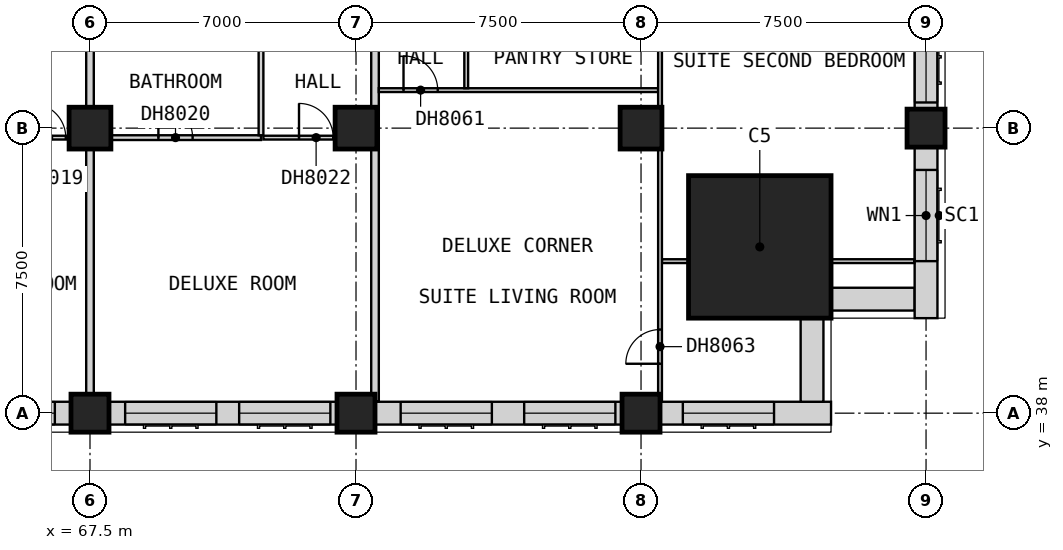
"""IFC4 building model, lengths in metres.
Left out: names, types, materials, properties, quantities, classifications, styles, units other than length and angle.
Written with IfcOpenShell. Run it as: python <this file> out.ifc"""

import sys

from ifc_helpers import new_model, si_unit, direction, frame, frame_2d, origin, origin_2d, place, context, subcontext, project, spatial, rectangle, extrude, element, fill, save


model = new_model("IFC4")
c1 = context("Model", 3, precision=1e-05, world=origin(), true_north=direction((0.0, 1.0)))
c2 = subcontext(c1, "Body", "Model", "MODEL_VIEW")
j1 = project(units=[si_unit("LENGTHUNIT", "METRE"), si_unit("PLANEANGLEUNIT", "RADIAN")], contexts=[c1])
p1 = place(None, origin())
s1 = spatial("IfcSite", under=j1, at=p1, CompositionType="ELEMENT")
p2 = place(p1, origin())
s2 = spatial("IfcBuilding", under=s1, at=p2, CompositionType="ELEMENT")
p3 = place(p2, frame((0.0, 0.0, 89.9)))
s3 = spatial("IfcBuildingStorey", under=s2, at=p3, CompositionType="ELEMENT", Elevation=89.9)
p4 = place(p3, frame((67.5, 38.0, 0.0), z_axis=(0.0, 0.0, 1.0), x_axis=(1.0, 0.0, 0.0)))
e1 = element("IfcColumn", 1, at=p4, inside=s3, PredefinedType="COLUMN", context=c2, shape_type="SweptSolid", body=[
    extrude(rectangle(XDim=1.0, YDim=1.0, at=origin_2d()), origin(), (0.0, 0.0, 1.0), 3.6),
])
p5 = place(p3, frame((67.5, 45.5, 0.0), z_axis=(0.0, 0.0, 1.0), x_axis=(1.0, 0.0, 0.0)))
e2 = element("IfcColumn", 2, at=p5, inside=s3, PredefinedType="COLUMN", context=c2, shape_type="SweptSolid", body=[
    extrude(rectangle(XDim=1.1, YDim=1.1, at=origin_2d()), origin(), (0.0, 0.0, 1.0), 3.6),
])
p6 = place(p3, frame((74.5, 38.0, 0.0), z_axis=(0.0, 0.0, 1.0), x_axis=(1.0, 0.0, 0.0)))
e3 = element("IfcColumn", 3, at=p6, inside=s3, PredefinedType="COLUMN", context=c2, shape_type="SweptSolid", body=[
    extrude(rectangle(XDim=1.0, YDim=1.0, at=origin_2d()), origin(), (0.0, 0.0, 1.0), 3.6),
])
p7 = place(p3, frame((74.5, 45.5, 0.0), z_axis=(0.0, 0.0, 1.0), x_axis=(1.0, 0.0, 0.0)))
e4 = element("IfcColumn", 4, at=p7, inside=s3, PredefinedType="COLUMN", context=c2, shape_type="SweptSolid", body=[
    extrude(rectangle(XDim=1.1, YDim=1.1, at=origin_2d()), origin(), (0.0, 0.0, 1.0), 3.6),
])
p8 = place(p3, frame((82.0, 38.0, 0.0), z_axis=(0.0, 0.0, 1.0), x_axis=(1.0, 0.0, 0.0)))
e5 = element("IfcColumn", 5, at=p8, inside=s3, PredefinedType="COLUMN", context=c2, shape_type="SweptSolid", body=[
    extrude(rectangle(XDim=1.0, YDim=1.0, at=origin_2d()), origin(), (0.0, 0.0, 1.0), 3.6),
])
p9 = place(p3, frame((82.0, 45.5, 0.0), z_axis=(0.0, 0.0, 1.0), x_axis=(1.0, 0.0, 0.0)))
e6 = element("IfcColumn", 6, at=p9, inside=s3, PredefinedType="COLUMN", context=c2, shape_type="SweptSolid", body=[
    extrude(rectangle(XDim=1.1, YDim=1.1, at=origin_2d()), origin(), (0.0, 0.0, 1.0), 3.6),
])
p10 = place(p3, frame((89.5, 45.5, 0.0), z_axis=(0.0, 0.0, 1.0), x_axis=(1.0, 0.0, 0.0)))
e7 = element("IfcColumn", 7, at=p10, inside=s3, PredefinedType="COLUMN", context=c2, shape_type="SweptSolid", body=[
    extrude(rectangle(XDim=1.0, YDim=1.0, at=origin_2d()), origin(), (0.0, 0.0, 1.0), 3.6),
])
p11 = place(p3, frame((85.125, 42.375, 0.0), z_axis=(0.0, 0.0, 1.0), x_axis=(1.0, 0.0, 0.0)))
e8 = element("IfcColumn", 8, at=p11, inside=s3, PredefinedType="COLUMN", context=c2, shape_type="SweptSolid", body=[
    extrude(rectangle(XDim=3.75, YDim=3.75, at=origin_2d()), origin(), (0.0, 0.0, 1.0), 3.6),
])
p12 = place(p3, frame((60.5, 38.0, 0.0), z_axis=(0.0, 0.0, 1.0), x_axis=(1.0, 0.0, 0.0)))
e9 = element("IfcWall", 9, at=p12, inside=s3, PredefinedType="SOLIDWALL", context=c2, shape_type="SweptSolid", body=[
    extrude(rectangle(XDim=6.5, YDim=0.6, at=frame_2d((3.25, 0.0))), origin(), (0.0, 0.0, 1.0), 2.85),
])
p13 = place(p12, frame((0.425, 0.0, 0.8)))
e10 = element("IfcOpeningElement", 10, at=p13, cuts=e9, PredefinedType="OPENING", context=c2, shape_type="SweptSolid", body=[
    extrude(rectangle(XDim=2.4, YDim=1.8, at=frame_2d((1.2, 0.9))), frame((0.0, 0.31, 0.0), z_axis=(0.0, -1.0, 0.0), x_axis=(1.0, 0.0, 0.0)), (0.0, 0.0, 1.0), 0.62),
])
p14 = place(p12, frame((3.675, 0.0, 0.8)))
e11 = element("IfcOpeningElement", 11, at=p14, cuts=e9, PredefinedType="OPENING", context=c2, shape_type="SweptSolid", body=[
    extrude(rectangle(XDim=2.4, YDim=1.8, at=frame_2d((1.2, 0.9))), frame((0.0, 0.31, 0.0), z_axis=(0.0, -1.0, 0.0), x_axis=(1.0, 0.0, 0.0)), (0.0, 0.0, 1.0), 0.62),
])
p15 = place(p3, frame((68.0, 38.0, 0.0), z_axis=(0.0, 0.0, 1.0), x_axis=(1.0, 0.0, 0.0)))
e12 = element("IfcWall", 12, at=p15, inside=s3, PredefinedType="SOLIDWALL", context=c2, shape_type="SweptSolid", body=[
    extrude(rectangle(XDim=6.0, YDim=0.6, at=frame_2d((3.0, 0.0))), origin(), (0.0, 0.0, 1.0), 2.85),
])
p16 = place(p15, frame((0.425, 0.0, 0.8)))
e13 = element("IfcOpeningElement", 13, at=p16, cuts=e12, PredefinedType="OPENING", context=c2, shape_type="SweptSolid", body=[
    extrude(rectangle(XDim=2.4, YDim=1.8, at=frame_2d((1.2, 0.9))), frame((0.0, 0.31, 0.0), z_axis=(0.0, -1.0, 0.0), x_axis=(1.0, 0.0, 0.0)), (0.0, 0.0, 1.0), 0.62),
])
p17 = place(p15, frame((3.425, 0.0, 0.8)))
e14 = element("IfcOpeningElement", 14, at=p17, cuts=e12, PredefinedType="OPENING", context=c2, shape_type="SweptSolid", body=[
    extrude(rectangle(XDim=2.4, YDim=1.8, at=frame_2d((1.2, 0.9))), frame((0.0, 0.31, 0.0), z_axis=(0.0, -1.0, 0.0), x_axis=(1.0, 0.0, 0.0)), (0.0, 0.0, 1.0), 0.62),
])
p18 = place(p3, frame((75.0, 38.0, 0.0), z_axis=(0.0, 0.0, 1.0), x_axis=(1.0, 0.0, 0.0)))
e15 = element("IfcWall", 15, at=p18, inside=s3, PredefinedType="SOLIDWALL", context=c2, shape_type="SweptSolid", body=[
    extrude(rectangle(XDim=6.5, YDim=0.6, at=frame_2d((3.25, 0.0))), origin(), (0.0, 0.0, 1.0), 2.85),
])
p19 = place(p18, frame((0.675, 0.0, 0.8)))
e16 = element("IfcOpeningElement", 16, at=p19, cuts=e15, PredefinedType="OPENING", context=c2, shape_type="SweptSolid", body=[
    extrude(rectangle(XDim=2.4, YDim=1.8, at=frame_2d((1.2, 0.9))), frame((0.0, 0.31, 0.0), z_axis=(0.0, -1.0, 0.0), x_axis=(1.0, 0.0, 0.0)), (0.0, 0.0, 1.0), 0.62),
])
p20 = place(p18, frame((3.925, 0.0, 0.8)))
e17 = element("IfcOpeningElement", 17, at=p20, cuts=e15, PredefinedType="OPENING", context=c2, shape_type="SweptSolid", body=[
    extrude(rectangle(XDim=2.4, YDim=1.8, at=frame_2d((1.2, 0.9))), frame((0.0, 0.31, 0.0), z_axis=(0.0, -1.0, 0.0), x_axis=(1.0, 0.0, 0.0)), (0.0, 0.0, 1.0), 0.62),
])
p21 = place(p3, frame((82.5, 38.0, 0.0), z_axis=(0.0, 0.0, 1.0), x_axis=(1.0, 0.0, 0.0)))
e18 = element("IfcWall", 18, at=p21, inside=s3, PredefinedType="SOLIDWALL", context=c2, shape_type="SweptSolid", body=[
    extrude(rectangle(XDim=4.5, YDim=0.6, at=frame_2d((2.25, 0.0))), origin(), (0.0, 0.0, 1.0), 2.85),
])
p22 = place(p21, frame((0.6, 0.0, 0.8)))
e19 = element("IfcOpeningElement", 19, at=p22, cuts=e18, PredefinedType="OPENING", context=c2, shape_type="SweptSolid", body=[
    extrude(rectangle(XDim=2.4, YDim=1.8, at=frame_2d((1.2, 0.9))), frame((0.0, 0.31, 0.0), z_axis=(0.0, -1.0, 0.0), x_axis=(1.0, 0.0, 0.0)), (0.0, 0.0, 1.0), 0.62),
])
for number, where, z_axis, x_axis in (
    (20, (86.5, 38.3, 0.0), (0.0, 0.0, 1.0), (0.0, 1.0, 0.0)),
    (21, (87.0, 41.0, 0.0), (0.0, 0.0, 1.0), (1.0, 0.0, 0.0)),
):
    element("IfcWall", number, at=place(p3, frame(where, z_axis=z_axis, x_axis=x_axis)), inside=s3, PredefinedType="SOLIDWALL", context=c2, shape_type="SweptSolid", body=[
        extrude(rectangle(XDim=2.2, YDim=0.6, at=frame_2d((1.1, 0.0))), origin(), (0.0, 0.0, 1.0), 3.35),
    ])
p23 = place(p3, frame((89.5, 40.5, 0.0), z_axis=(0.0, 0.0, 1.0), x_axis=(0.0, 1.0, 0.0)))
e22 = element("IfcWall", 22, at=p23, inside=s3, PredefinedType="SOLIDWALL", context=c2, shape_type="SweptSolid", body=[
    extrude(rectangle(XDim=4.5, YDim=0.6, at=frame_2d((2.25, 0.0))), origin(), (0.0, 0.0, 1.0), 2.85),
])
p24 = place(p23, frame((1.5, 0.0, 0.8)))
e23 = element("IfcOpeningElement", 23, at=p24, cuts=e22, PredefinedType="OPENING", context=c2, shape_type="SweptSolid", body=[
    extrude(rectangle(XDim=2.4, YDim=1.8, at=frame_2d((1.2, 0.9))), frame((0.0, 0.31, 0.0), z_axis=(0.0, -1.0, 0.0), x_axis=(1.0, 0.0, 0.0)), (0.0, 0.0, 1.0), 0.62),
])
p25 = place(p3, frame((89.5, 46.0, 0.0), z_axis=(0.0, 0.0, 1.0), x_axis=(0.0, 1.0, 0.0)))
e24 = element("IfcWall", 24, at=p25, inside=s3, PredefinedType="SOLIDWALL", context=c2, shape_type="SweptSolid", body=[
    extrude(rectangle(XDim=6.0, YDim=0.6, at=frame_2d((3.0, 0.0))), origin(), (0.0, 0.0, 1.0), 2.85),
])
p26 = place(p25, frame((0.175, 0.0, 0.8)))
e25 = element("IfcOpeningElement", 25, at=p26, cuts=e24, PredefinedType="OPENING", context=c2, shape_type="SweptSolid", body=[
    extrude(rectangle(XDim=2.4, YDim=1.8, at=frame_2d((1.2, 0.9))), frame((0.0, 0.31, 0.0), z_axis=(0.0, -1.0, 0.0), x_axis=(1.0, 0.0, 0.0)), (0.0, 0.0, 1.0), 0.62),
])
p27 = place(p25, frame((3.175, 0.0, 0.8)))
e26 = element("IfcOpeningElement", 26, at=p27, cuts=e24, PredefinedType="OPENING", context=c2, shape_type="SweptSolid", body=[
    extrude(rectangle(XDim=2.4, YDim=1.8, at=frame_2d((1.2, 0.9))), frame((0.0, 0.31, 0.0), z_axis=(0.0, -1.0, 0.0), x_axis=(1.0, 0.0, 0.0)), (0.0, 0.0, 1.0), 0.62),
])
p28 = place(p3, frame((67.5, 37.5, 0.0), z_axis=(0.0, 0.0, 1.0), x_axis=(0.0, 1.0, 0.0)))
e27 = element("IfcWall", 27, at=p28, inside=s3, PredefinedType="PARTITIONING", context=c2, shape_type="SweptSolid", body=[
    extrude(rectangle(XDim=12.525, YDim=0.2, at=frame_2d((6.262, 0.0))), origin(), (0.0, 0.0, 1.0), 3.35),
])
p29 = place(p3, frame((75.0, 38.31, 0.0), z_axis=(0.0, 0.0, 1.0), x_axis=(0.0, 1.0, 0.0)))
e28 = element("IfcWall", 28, at=p29, inside=s3, PredefinedType="PARTITIONING", context=c2, shape_type="SweptSolid", body=[
    extrude(rectangle(XDim=11.715, YDim=0.2, at=frame_2d((5.857, 0.0))), origin(), (0.0, 0.0, 1.0), 3.35),
])
p30 = place(p3, frame((82.55, 42.0, 0.0), z_axis=(0.0, 0.0, 1.0), x_axis=(1.0, 0.0, 0.0)))
e29 = element("IfcWall", 29, at=p30, inside=s3, PredefinedType="PARTITIONING", context=c2, shape_type="SweptSolid", body=[
    extrude(rectangle(XDim=6.64, YDim=0.1, at=frame_2d((3.32, 0.0))), origin(), (0.0, 0.0, 1.0), 3.35),
])
p31 = place(p3, frame((65.688, 45.25, 0.0), z_axis=(0.0, 0.0, 1.0), x_axis=(1.0, 0.0, 0.0)))
e30 = element("IfcWall", 30, at=p31, inside=s3, PredefinedType="PARTITIONING", context=c2, shape_type="SweptSolid", body=[
    extrude(rectangle(XDim=1.712, YDim=0.1, at=frame_2d((0.856, 0.0))), origin(), (0.0, 0.0, 1.0), 3.35),
])
p32 = place(p31, frame((0.275, 0.0, 0.0)))
e31 = element("IfcOpeningElement", 31, at=p32, cuts=e30, PredefinedType="OPENING", context=c2, shape_type="SweptSolid", body=[
    extrude(rectangle(XDim=0.9, YDim=2.1, at=frame_2d((0.45, 1.05))), frame((0.0, 0.06, 0.0), z_axis=(0.0, -1.0, 0.0), x_axis=(1.0, 0.0, 0.0)), (0.0, 0.0, 1.0), 0.12),
])
p33 = place(p3, frame((72.062, 45.25, 0.0), z_axis=(0.0, 0.0, 1.0), x_axis=(1.0, 0.0, 0.0)))
e32 = element("IfcWall", 32, at=p33, inside=s3, PredefinedType="PARTITIONING", context=c2, shape_type="SweptSolid", body=[
    extrude(rectangle(XDim=2.837, YDim=0.1, at=frame_2d((1.419, 0.0))), origin(), (0.0, 0.0, 1.0), 3.35),
])
p34 = place(p33, frame((0.938, 0.0, 0.0)))
e33 = element("IfcOpeningElement", 33, at=p34, cuts=e32, PredefinedType="OPENING", context=c2, shape_type="SweptSolid", body=[
    extrude(rectangle(XDim=0.9, YDim=2.1, at=frame_2d((0.45, 1.05))), frame((0.0, 0.06, 0.0), z_axis=(0.0, -1.0, 0.0), x_axis=(1.0, 0.0, 0.0)), (0.0, 0.0, 1.0), 0.12),
])
p35 = place(p3, frame((75.1, 46.5, 0.0), z_axis=(0.0, 0.0, 1.0), x_axis=(1.0, 0.0, 0.0)))
e34 = element("IfcWall", 34, at=p35, inside=s3, PredefinedType="PARTITIONING", context=c2, shape_type="SweptSolid", body=[
    extrude(rectangle(XDim=7.35, YDim=0.1, at=frame_2d((3.675, 0.0))), origin(), (0.0, 0.0, 1.0), 3.35),
])
p36 = place(p35, frame((0.65, 0.0, 0.0)))
e35 = element("IfcOpeningElement", 35, at=p36, cuts=e34, PredefinedType="OPENING", context=c2, shape_type="SweptSolid", body=[
    extrude(rectangle(XDim=0.9, YDim=2.1, at=frame_2d((0.45, 1.05))), frame((0.0, 0.06, 0.0), z_axis=(0.0, -1.0, 0.0), x_axis=(1.0, 0.0, 0.0)), (0.0, 0.0, 1.0), 0.12),
])
p37 = place(p3, frame((77.4, 46.55, 0.0), z_axis=(0.0, 0.0, 1.0), x_axis=(0.0, 1.0, 0.0)))
e36 = element("IfcWall", 36, at=p37, inside=s3, PredefinedType="PARTITIONING", context=c2, shape_type="SweptSolid", body=[
    extrude(rectangle(XDim=3.475, YDim=0.1, at=frame_2d((1.737, 0.0))), origin(), (0.0, 0.0, 1.0), 3.35),
])
p38 = place(p37, frame((1.3, 0.0, 0.0)))
e37 = element("IfcOpeningElement", 37, at=p38, cuts=e36, PredefinedType="OPENING", context=c2, shape_type="SweptSolid", body=[
    extrude(rectangle(XDim=0.9, YDim=2.1, at=frame_2d((0.45, 1.05))), frame((0.0, 0.06, 0.0), z_axis=(0.0, -1.0, 0.0), x_axis=(1.0, 0.0, 0.0)), (0.0, 0.0, 1.0), 0.12),
])
p39 = place(p3, frame((82.5, 38.31, 0.0), z_axis=(0.0, 0.0, 1.0), x_axis=(0.0, 1.0, 0.0)))
e38 = element("IfcWall", 38, at=p39, inside=s3, PredefinedType="PARTITIONING", context=c2, shape_type="SweptSolid", body=[
    extrude(rectangle(XDim=11.728, YDim=0.1, at=frame_2d((5.864, 0.0))), origin(), (0.0, 0.0, 1.0), 3.35),
])
p40 = place(p39, frame((0.99, 0.0, 0.0)))
e39 = element("IfcOpeningElement", 39, at=p40, cuts=e38, PredefinedType="OPENING", context=c2, shape_type="SweptSolid", body=[
    extrude(rectangle(XDim=0.9, YDim=2.1, at=frame_2d((0.45, 1.05))), frame((0.0, 0.06, 0.0), z_axis=(0.0, -1.0, 0.0), x_axis=(1.0, 0.0, 0.0)), (0.0, 0.0, 1.0), 0.12),
])
p41 = place(p39, frame((9.54, 0.0, 0.0)))
e40 = element("IfcOpeningElement", 40, at=p41, cuts=e38, PredefinedType="OPENING", context=c2, shape_type="SweptSolid", body=[
    extrude(rectangle(XDim=0.9, YDim=2.1, at=frame_2d((0.45, 1.05))), frame((0.0, 0.06, 0.0), z_axis=(0.0, -1.0, 0.0), x_axis=(1.0, 0.0, 0.0)), (0.0, 0.0, 1.0), 0.12),
])
p42 = place(p3, frame((67.6, 45.25, 0.0), z_axis=(0.0, 0.0, 1.0), x_axis=(1.0, 0.0, 0.0)))
e41 = element("IfcWall", 41, at=p42, inside=s3, PredefinedType="PARTITIONING", context=c2, shape_type="SweptSolid", body=[
    extrude(rectangle(XDim=4.4, YDim=0.125, at=frame_2d((2.2, 0.0))), origin(), (0.0, 0.0, 1.0), 3.35),
])
p43 = place(p42, frame((1.7, 0.0, 0.0)))
e42 = element("IfcOpeningElement", 42, at=p43, cuts=e41, PredefinedType="OPENING", context=c2, shape_type="SweptSolid", body=[
    extrude(rectangle(XDim=0.9, YDim=2.1, at=frame_2d((0.45, 1.05))), frame((0.0, 0.073, 0.0), z_axis=(0.0, -1.0, 0.0), x_axis=(1.0, 0.0, 0.0)), (0.0, 0.0, 1.0), 0.145),
])
p44 = place(p3, frame((72.0, 45.312, 0.0), z_axis=(0.0, 0.0, 1.0), x_axis=(0.0, 1.0, 0.0)))
e43 = element("IfcWall", 43, at=p44, inside=s3, PredefinedType="PARTITIONING", context=c2, shape_type="SweptSolid", body=[
    extrude(rectangle(XDim=4.712, YDim=0.125, at=frame_2d((2.356, 0.0))), origin(), (0.0, 0.0, 1.0), 3.35),
])
p45 = place(p14, origin())
e44 = element("IfcWindow", 44, at=p45, inside=s3, PartitioningType="SINGLE_PANEL", PredefinedType="WINDOW", context=c2, shape_type="SweptSolid", body=[
    extrude(rectangle(XDim=2.4, YDim=1.8, at=frame_2d((1.2, 0.9))), frame((0.0, -0.07, 0.0), z_axis=(0.0, -1.0, 0.0), x_axis=(1.0, 0.0, 0.0)), (0.0, 0.0, 1.0), 0.06),
])
fill(e11, e44)
p46 = place(p16, origin())
e45 = element("IfcWindow", 45, at=p46, inside=s3, PartitioningType="SINGLE_PANEL", PredefinedType="WINDOW", context=c2, shape_type="SweptSolid", body=[
    extrude(rectangle(XDim=2.4, YDim=1.8, at=frame_2d((1.2, 0.9))), frame((0.0, -0.07, 0.0), z_axis=(0.0, -1.0, 0.0), x_axis=(1.0, 0.0, 0.0)), (0.0, 0.0, 1.0), 0.06),
])
fill(e13, e45)
p47 = place(p17, origin())
e46 = element("IfcWindow", 46, at=p47, inside=s3, PartitioningType="SINGLE_PANEL", PredefinedType="WINDOW", context=c2, shape_type="SweptSolid", body=[
    extrude(rectangle(XDim=2.4, YDim=1.8, at=frame_2d((1.2, 0.9))), frame((0.0, -0.07, 0.0), z_axis=(0.0, -1.0, 0.0), x_axis=(1.0, 0.0, 0.0)), (0.0, 0.0, 1.0), 0.06),
])
fill(e14, e46)
p48 = place(p19, origin())
e47 = element("IfcWindow", 47, at=p48, inside=s3, PartitioningType="SINGLE_PANEL", PredefinedType="WINDOW", context=c2, shape_type="SweptSolid", body=[
    extrude(rectangle(XDim=2.4, YDim=1.8, at=frame_2d((1.2, 0.9))), frame((0.0, -0.07, 0.0), z_axis=(0.0, -1.0, 0.0), x_axis=(1.0, 0.0, 0.0)), (0.0, 0.0, 1.0), 0.06),
])
fill(e16, e47)
p49 = place(p20, origin())
e48 = element("IfcWindow", 48, at=p49, inside=s3, PartitioningType="SINGLE_PANEL", PredefinedType="WINDOW", context=c2, shape_type="SweptSolid", body=[
    extrude(rectangle(XDim=2.4, YDim=1.8, at=frame_2d((1.2, 0.9))), frame((0.0, -0.07, 0.0), z_axis=(0.0, -1.0, 0.0), x_axis=(1.0, 0.0, 0.0)), (0.0, 0.0, 1.0), 0.06),
])
fill(e17, e48)
p50 = place(p22, origin())
e49 = element("IfcWindow", 49, at=p50, inside=s3, PartitioningType="SINGLE_PANEL", PredefinedType="WINDOW", context=c2, shape_type="SweptSolid", body=[
    extrude(rectangle(XDim=2.4, YDim=1.8, at=frame_2d((1.2, 0.9))), frame((0.0, -0.07, 0.0), z_axis=(0.0, -1.0, 0.0), x_axis=(1.0, 0.0, 0.0)), (0.0, 0.0, 1.0), 0.06),
])
fill(e19, e49)
p51 = place(p24, origin())
e50 = element("IfcWindow", 50, at=p51, inside=s3, PartitioningType="SINGLE_PANEL", PredefinedType="WINDOW", context=c2, shape_type="SweptSolid", body=[
    extrude(rectangle(XDim=2.4, YDim=1.8, at=frame_2d((1.2, 0.9))), frame((0.0, -0.07, 0.0), z_axis=(0.0, -1.0, 0.0), x_axis=(1.0, 0.0, 0.0)), (0.0, 0.0, 1.0), 0.06),
])
fill(e23, e50)
p52 = place(p26, origin())
e51 = element("IfcWindow", 51, at=p52, inside=s3, PartitioningType="SINGLE_PANEL", PredefinedType="WINDOW", context=c2, shape_type="SweptSolid", body=[
    extrude(rectangle(XDim=2.4, YDim=1.8, at=frame_2d((1.2, 0.9))), frame((0.0, -0.07, 0.0), z_axis=(0.0, -1.0, 0.0), x_axis=(1.0, 0.0, 0.0)), (0.0, 0.0, 1.0), 0.06),
])
fill(e25, e51)
p53 = place(p32, origin())
e52 = element("IfcDoor", 52, at=p53, inside=s3, OperationType="SINGLE_SWING_LEFT", PredefinedType="DOOR", context=c2, shape_type="SweptSolid", body=[
    extrude(rectangle(XDim=0.9, YDim=2.1, at=frame_2d((0.45, 1.05))), frame((0.0, 0.025, 0.0), z_axis=(0.0, -1.0, 0.0), x_axis=(1.0, 0.0, 0.0)), (0.0, 0.0, 1.0), 0.05),
])
fill(e31, e52)
p54 = place(p43, origin())
e53 = element("IfcDoor", 53, at=p54, inside=s3, OperationType="SINGLE_SWING_LEFT", PredefinedType="DOOR", context=c2, shape_type="SweptSolid", body=[
    extrude(rectangle(XDim=0.9, YDim=2.1, at=frame_2d((0.45, 1.05))), frame((0.0, 0.025, 0.0), z_axis=(0.0, -1.0, 0.0), x_axis=(1.0, 0.0, 0.0)), (0.0, 0.0, 1.0), 0.05),
])
fill(e42, e53)
p55 = place(p34, origin())
e54 = element("IfcDoor", 54, at=p55, inside=s3, OperationType="SINGLE_SWING_LEFT", PredefinedType="DOOR", context=c2, shape_type="SweptSolid", body=[
    extrude(rectangle(XDim=0.9, YDim=2.1, at=frame_2d((0.45, 1.05))), frame((0.0, 0.025, 0.0), z_axis=(0.0, -1.0, 0.0), x_axis=(1.0, 0.0, 0.0)), (0.0, 0.0, 1.0), 0.05),
])
fill(e33, e54)
p56 = place(p36, origin())
e55 = element("IfcDoor", 55, at=p56, inside=s3, OperationType="SINGLE_SWING_RIGHT", PredefinedType="DOOR", context=c2, shape_type="SweptSolid", body=[
    extrude(rectangle(XDim=0.9, YDim=2.1, at=frame_2d((0.45, 1.05))), frame((0.0, 0.025, 0.0), z_axis=(0.0, -1.0, 0.0), x_axis=(1.0, 0.0, 0.0)), (0.0, 0.0, 1.0), 0.05),
])
fill(e35, e55)
p57 = place(p40, origin())
e56 = element("IfcDoor", 56, at=p57, inside=s3, OperationType="SINGLE_SWING_LEFT", PredefinedType="DOOR", context=c2, shape_type="SweptSolid", body=[
    extrude(rectangle(XDim=0.9, YDim=2.1, at=frame_2d((0.45, 1.05))), frame((0.0, 0.025, 0.0), z_axis=(0.0, -1.0, 0.0), x_axis=(1.0, 0.0, 0.0)), (0.0, 0.0, 1.0), 0.05),
])
fill(e39, e56)
save(model, sys.argv[1])
